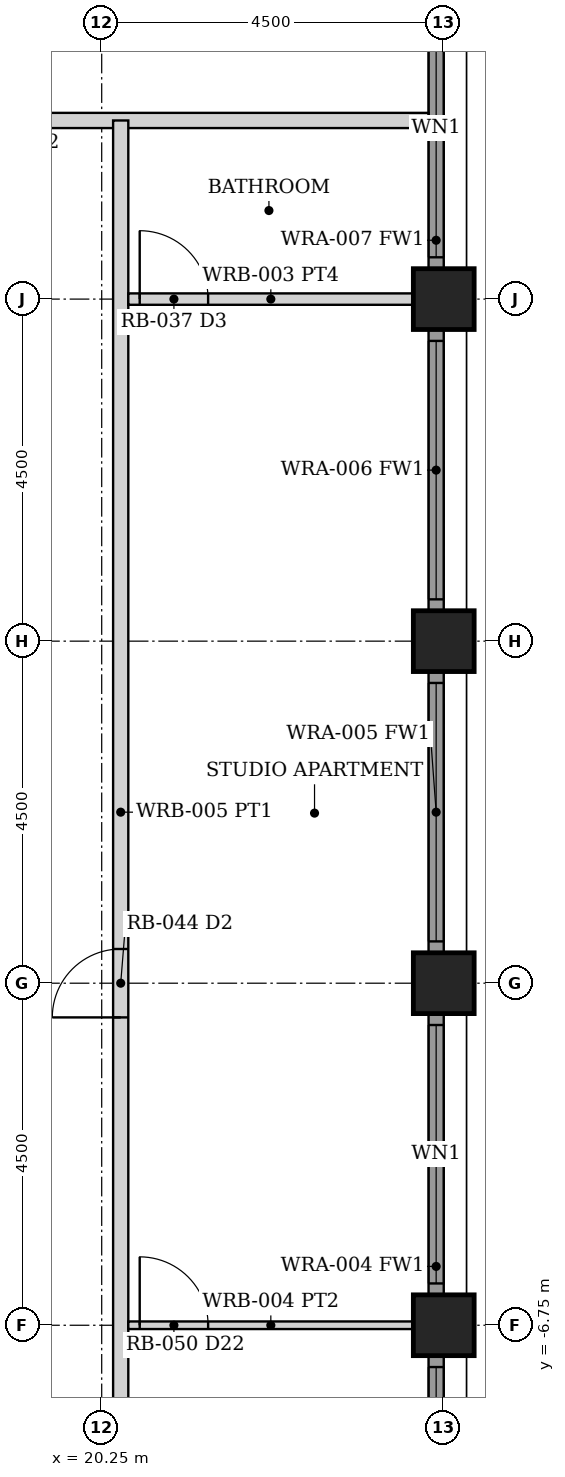
"""IFC4 building model, lengths in metres.
Left out: names, types, materials, properties, quantities, classifications, styles, units other than length and angle.
Written with IfcOpenShell. Run it as: python <this file> out.ifc"""

import sys

from ifc_helpers import new_model, si_unit, direction, frame, frame_2d, origin, origin_2d, place, context, subcontext, project, spatial, rectangle, hollow_rectangle, extrude, element, fill, save


model = new_model("IFC4")
c1 = context("Model", 3, precision=1e-05, world=origin(), true_north=direction((0.0, 1.0)))
c2 = subcontext(c1, "Body", "Model", "MODEL_VIEW")
j1 = project(units=[si_unit("LENGTHUNIT", "METRE"), si_unit("PLANEANGLEUNIT", "RADIAN")], contexts=[c1])
p1 = place(None, origin())
s1 = spatial("IfcSite", under=j1, at=p1, CompositionType="ELEMENT")
p2 = place(p1, origin())
s2 = spatial("IfcBuilding", under=s1, at=p2, CompositionType="ELEMENT")
p3 = place(p2, frame((0.0, 0.0, 37.0)))
s3 = spatial("IfcBuildingStorey", under=s2, at=p3, CompositionType="ELEMENT", Elevation=37.0)
for number, where, z_axis, x_axis in (
    (1, (24.75, -6.75, 0.0), (0.0, 0.0, 1.0), (1.0, 0.0, 0.0)),
    (2, (24.75, -2.25, 0.0), (0.0, 0.0, 1.0), (1.0, 0.0, 0.0)),
    (3, (24.75, 2.25, 0.0), (0.0, 0.0, 1.0), (1.0, 0.0, 0.0)),
    (4, (24.75, 6.75, 0.0), (0.0, 0.0, 1.0), (1.0, 0.0, 0.0)),
):
    element("IfcColumn", number, at=place(p3, frame(where, z_axis=z_axis, x_axis=x_axis)), inside=s3, PredefinedType="COLUMN", context=c2, shape_type="SweptSolid", body=[
        extrude(hollow_rectangle(XDim=0.8, YDim=0.8, WallThickness=0.07, at=origin_2d()), origin(), (0.0, 0.0, 1.0), 3.5),
    ])
p4 = place(p3, frame((24.65, -10.845, 0.0), z_axis=(0.0, 0.0, 1.0), x_axis=(0.0, 1.0, 0.0)))
e5 = element("IfcWall", 5, at=p4, inside=s3, PredefinedType="SOLIDWALL", context=c2, shape_type="SweptSolid", body=[
    extrude(rectangle(XDim=3.69, YDim=0.2, at=frame_2d((1.845, 0.0))), origin(), (0.0, 0.0, 1.0), 2.379),
])
p5 = place(p4, frame((0.145, 0.0, 0.3)))
e6 = element("IfcOpeningElement", 6, at=p5, cuts=e5, PredefinedType="OPENING", context=c2, shape_type="SweptSolid", body=[
    extrude(rectangle(XDim=3.4, YDim=1.929, at=frame_2d((1.7, 0.964))), frame((0.0, 0.11, 0.0), z_axis=(0.0, -1.0, 0.0), x_axis=(1.0, 0.0, 0.0)), (0.0, 0.0, 1.0), 0.22),
])
p6 = place(p3, frame((24.65, -6.345, 0.0), z_axis=(0.0, 0.0, 1.0), x_axis=(0.0, 1.0, 0.0)))
e7 = element("IfcWall", 7, at=p6, inside=s3, PredefinedType="SOLIDWALL", context=c2, shape_type="SweptSolid", body=[
    extrude(rectangle(XDim=3.69, YDim=0.2, at=frame_2d((1.845, 0.0))), origin(), (0.0, 0.0, 1.0), 2.379),
])
p7 = place(p6, frame((0.145, 0.0, 0.3)))
e8 = element("IfcOpeningElement", 8, at=p7, cuts=e7, PredefinedType="OPENING", context=c2, shape_type="SweptSolid", body=[
    extrude(rectangle(XDim=3.4, YDim=1.929, at=frame_2d((1.7, 0.964))), frame((0.0, 0.11, 0.0), z_axis=(0.0, -1.0, 0.0), x_axis=(1.0, 0.0, 0.0)), (0.0, 0.0, 1.0), 0.22),
])
p8 = place(p3, frame((24.65, -1.845, 0.0), z_axis=(0.0, 0.0, 1.0), x_axis=(0.0, 1.0, 0.0)))
e9 = element("IfcWall", 9, at=p8, inside=s3, PredefinedType="SOLIDWALL", context=c2, shape_type="SweptSolid", body=[
    extrude(rectangle(XDim=3.69, YDim=0.2, at=frame_2d((1.845, 0.0))), origin(), (0.0, 0.0, 1.0), 2.379),
])
p9 = place(p8, frame((0.145, 0.0, 0.3)))
e10 = element("IfcOpeningElement", 10, at=p9, cuts=e9, PredefinedType="OPENING", context=c2, shape_type="SweptSolid", body=[
    extrude(rectangle(XDim=3.4, YDim=1.929, at=frame_2d((1.7, 0.964))), frame((0.0, 0.11, 0.0), z_axis=(0.0, -1.0, 0.0), x_axis=(1.0, 0.0, 0.0)), (0.0, 0.0, 1.0), 0.22),
])
p10 = place(p3, frame((24.65, 2.655, 0.0), z_axis=(0.0, 0.0, 1.0), x_axis=(0.0, 1.0, 0.0)))
e11 = element("IfcWall", 11, at=p10, inside=s3, PredefinedType="SOLIDWALL", context=c2, shape_type="SweptSolid", body=[
    extrude(rectangle(XDim=3.69, YDim=0.2, at=frame_2d((1.845, 0.0))), origin(), (0.0, 0.0, 1.0), 2.379),
])
p11 = place(p10, frame((0.145, 0.0, 0.3)))
e12 = element("IfcOpeningElement", 12, at=p11, cuts=e11, PredefinedType="OPENING", context=c2, shape_type="SweptSolid", body=[
    extrude(rectangle(XDim=3.4, YDim=1.929, at=frame_2d((1.7, 0.964))), frame((0.0, 0.11, 0.0), z_axis=(0.0, -1.0, 0.0), x_axis=(1.0, 0.0, 0.0)), (0.0, 0.0, 1.0), 0.22),
])
p12 = place(p3, frame((24.65, 7.155, 0.0), z_axis=(0.0, 0.0, 1.0), x_axis=(0.0, 1.0, 0.0)))
e13 = element("IfcWall", 13, at=p12, inside=s3, PredefinedType="SOLIDWALL", context=c2, shape_type="SweptSolid", body=[
    extrude(rectangle(XDim=3.69, YDim=0.2, at=frame_2d((1.845, 0.0))), origin(), (0.0, 0.0, 1.0), 2.379),
])
p13 = place(p12, frame((0.145, 0.0, 0.3)))
e14 = element("IfcOpeningElement", 14, at=p13, cuts=e13, PredefinedType="OPENING", context=c2, shape_type="SweptSolid", body=[
    extrude(rectangle(XDim=3.4, YDim=1.929, at=frame_2d((1.7, 0.964))), frame((0.0, 0.11, 0.0), z_axis=(0.0, -1.0, 0.0), x_axis=(1.0, 0.0, 0.0)), (0.0, 0.0, 1.0), 0.22),
])
p14 = place(p3, frame((-24.55, 9.1, 0.0), z_axis=(0.0, 0.0, 1.0), x_axis=(1.0, 0.0, 0.0)))
e15 = element("IfcWall", 15, at=p14, inside=s3, PredefinedType="PARTITIONING", context=c2, shape_type="SweptSolid", body=[
    extrude(rectangle(XDim=49.1, YDim=0.2, at=frame_2d((24.55, 0.0))), origin(), (0.0, 0.0, 1.0), 2.373),
])
p15 = place(p14, frame((5.1, 0.0, 0.0)))
e16 = element("IfcOpeningElement", 16, at=p15, cuts=e15, PredefinedType="OPENING", context=c2, shape_type="SweptSolid", body=[
    extrude(rectangle(XDim=0.9, YDim=2.1, at=frame_2d((0.45, 1.05))), frame((0.0, 0.11, 0.0), z_axis=(0.0, -1.0, 0.0), x_axis=(1.0, 0.0, 0.0)), (0.0, 0.0, 1.0), 0.22),
])
p16 = place(p14, frame((13.6, 0.0, 0.0)))
e17 = element("IfcOpeningElement", 17, at=p16, cuts=e15, PredefinedType="OPENING", context=c2, shape_type="SweptSolid", body=[
    extrude(rectangle(XDim=0.9, YDim=2.1, at=frame_2d((0.45, 1.05))), frame((0.0, 0.11, 0.0), z_axis=(0.0, -1.0, 0.0), x_axis=(1.0, 0.0, 0.0)), (0.0, 0.0, 1.0), 0.22),
])
p17 = place(p14, frame((18.0, 0.0, 0.0)))
e18 = element("IfcOpeningElement", 18, at=p17, cuts=e15, PredefinedType="OPENING", context=c2, shape_type="SweptSolid", body=[
    extrude(rectangle(XDim=0.9, YDim=2.1, at=frame_2d((0.45, 1.05))), frame((0.0, 0.11, 0.0), z_axis=(0.0, -1.0, 0.0), x_axis=(1.0, 0.0, 0.0)), (0.0, 0.0, 1.0), 0.22),
])
p18 = place(p14, frame((22.5, 0.0, 0.0)))
e19 = element("IfcOpeningElement", 19, at=p18, cuts=e15, PredefinedType="OPENING", context=c2, shape_type="SweptSolid", body=[
    extrude(rectangle(XDim=0.9, YDim=2.1, at=frame_2d((0.45, 1.05))), frame((0.0, 0.11, 0.0), z_axis=(0.0, -1.0, 0.0), x_axis=(1.0, 0.0, 0.0)), (0.0, 0.0, 1.0), 0.22),
])
p19 = place(p14, frame((27.0, 0.0, 0.0)))
e20 = element("IfcOpeningElement", 20, at=p19, cuts=e15, PredefinedType="OPENING", context=c2, shape_type="SweptSolid", body=[
    extrude(rectangle(XDim=0.9, YDim=2.1, at=frame_2d((0.45, 1.05))), frame((0.0, 0.11, 0.0), z_axis=(0.0, -1.0, 0.0), x_axis=(1.0, 0.0, 0.0)), (0.0, 0.0, 1.0), 0.22),
])
p20 = place(p14, frame((31.6, 0.0, 0.0)))
e21 = element("IfcOpeningElement", 21, at=p20, cuts=e15, PredefinedType="OPENING", context=c2, shape_type="SweptSolid", body=[
    extrude(rectangle(XDim=0.9, YDim=2.1, at=frame_2d((0.45, 1.05))), frame((0.0, 0.11, 0.0), z_axis=(0.0, -1.0, 0.0), x_axis=(1.0, 0.0, 0.0)), (0.0, 0.0, 1.0), 0.22),
])
p21 = place(p14, frame((43.1, 0.0, 0.0)))
e22 = element("IfcOpeningElement", 22, at=p21, cuts=e15, PredefinedType="OPENING", context=c2, shape_type="SweptSolid", body=[
    extrude(rectangle(XDim=0.9, YDim=2.1, at=frame_2d((0.45, 1.05))), frame((0.0, 0.11, 0.0), z_axis=(0.0, -1.0, 0.0), x_axis=(1.0, 0.0, 0.0)), (0.0, 0.0, 1.0), 0.22),
])
p22 = place(p3, frame((20.5, -9.1, 0.0), z_axis=(0.0, 0.0, 1.0), x_axis=(0.0, 1.0, 0.0)))
e23 = element("IfcWall", 23, at=p22, inside=s3, PredefinedType="PARTITIONING", context=c2, shape_type="SweptSolid", body=[
    extrude(rectangle(XDim=18.2, YDim=0.2, at=frame_2d((9.1, 0.0))), origin(), (0.0, 0.0, 1.0), 2.373),
])
p23 = place(p22, frame((6.4, 0.0, 0.0)))
e24 = element("IfcOpeningElement", 24, at=p23, cuts=e23, PredefinedType="OPENING", context=c2, shape_type="SweptSolid", body=[
    extrude(rectangle(XDim=0.9, YDim=2.1, at=frame_2d((0.45, 1.05))), frame((0.0, 0.11, 0.0), z_axis=(0.0, -1.0, 0.0), x_axis=(1.0, 0.0, 0.0)), (0.0, 0.0, 1.0), 0.22),
])
p24 = place(p3, frame((20.6, -6.75, 0.0), z_axis=(0.0, 0.0, 1.0), x_axis=(1.0, 0.0, 0.0)))
e25 = element("IfcWall", 25, at=p24, inside=s3, PredefinedType="PARTITIONING", context=c2, shape_type="SweptSolid", body=[
    extrude(rectangle(XDim=3.75, YDim=0.1, at=frame_2d((1.875, 0.0))), origin(), (0.0, 0.0, 1.0), 2.373),
])
p25 = place(p24, frame((0.15, 0.0, 0.0)))
e26 = element("IfcOpeningElement", 26, at=p25, cuts=e25, PredefinedType="OPENING", context=c2, shape_type="SweptSolid", body=[
    extrude(rectangle(XDim=0.9, YDim=2.1, at=frame_2d((0.45, 1.05))), frame((0.0, 0.06, 0.0), z_axis=(0.0, -1.0, 0.0), x_axis=(1.0, 0.0, 0.0)), (0.0, 0.0, 1.0), 0.12),
])
p26 = place(p3, frame((20.6, 6.75, 0.0), z_axis=(0.0, 0.0, 1.0), x_axis=(1.0, 0.0, 0.0)))
e27 = element("IfcWall", 27, at=p26, inside=s3, PredefinedType="PARTITIONING", context=c2, shape_type="SweptSolid", body=[
    extrude(rectangle(XDim=3.75, YDim=0.15, at=frame_2d((1.875, 0.0))), origin(), (0.0, 0.0, 1.0), 2.373),
])
p27 = place(p26, frame((0.15, 0.0, 0.0)))
e28 = element("IfcOpeningElement", 28, at=p27, cuts=e27, PredefinedType="OPENING", context=c2, shape_type="SweptSolid", body=[
    extrude(rectangle(XDim=0.9, YDim=2.1, at=frame_2d((0.45, 1.05))), frame((0.0, 0.085, 0.0), z_axis=(0.0, -1.0, 0.0), x_axis=(1.0, 0.0, 0.0)), (0.0, 0.0, 1.0), 0.17),
])
p28 = place(p5, origin())
e29 = element("IfcWindow", 29, at=p28, inside=s3, PartitioningType="SINGLE_PANEL", PredefinedType="WINDOW", context=c2, shape_type="SweptSolid", body=[
    extrude(rectangle(XDim=3.4, YDim=1.929, at=frame_2d((1.7, 0.964))), frame((0.0, 0.03, 0.0), z_axis=(0.0, -1.0, 0.0), x_axis=(1.0, 0.0, 0.0)), (0.0, 0.0, 1.0), 0.06),
])
fill(e6, e29)
p29 = place(p7, origin())
e30 = element("IfcWindow", 30, at=p29, inside=s3, PartitioningType="SINGLE_PANEL", PredefinedType="WINDOW", context=c2, shape_type="SweptSolid", body=[
    extrude(rectangle(XDim=3.4, YDim=1.929, at=frame_2d((1.7, 0.964))), frame((0.0, 0.03, 0.0), z_axis=(0.0, -1.0, 0.0), x_axis=(1.0, 0.0, 0.0)), (0.0, 0.0, 1.0), 0.06),
])
fill(e8, e30)
p30 = place(p9, origin())
e31 = element("IfcWindow", 31, at=p30, inside=s3, PartitioningType="SINGLE_PANEL", PredefinedType="WINDOW", context=c2, shape_type="SweptSolid", body=[
    extrude(rectangle(XDim=3.4, YDim=1.929, at=frame_2d((1.7, 0.964))), frame((0.0, 0.03, 0.0), z_axis=(0.0, -1.0, 0.0), x_axis=(1.0, 0.0, 0.0)), (0.0, 0.0, 1.0), 0.06),
])
fill(e10, e31)
p31 = place(p11, origin())
e32 = element("IfcWindow", 32, at=p31, inside=s3, PartitioningType="SINGLE_PANEL", PredefinedType="WINDOW", context=c2, shape_type="SweptSolid", body=[
    extrude(rectangle(XDim=3.4, YDim=1.929, at=frame_2d((1.7, 0.964))), frame((0.0, 0.03, 0.0), z_axis=(0.0, -1.0, 0.0), x_axis=(1.0, 0.0, 0.0)), (0.0, 0.0, 1.0), 0.06),
])
fill(e12, e32)
p32 = place(p13, origin())
e33 = element("IfcWindow", 33, at=p32, inside=s3, PartitioningType="SINGLE_PANEL", PredefinedType="WINDOW", context=c2, shape_type="SweptSolid", body=[
    extrude(rectangle(XDim=3.4, YDim=1.929, at=frame_2d((1.7, 0.964))), frame((0.0, 0.03, 0.0), z_axis=(0.0, -1.0, 0.0), x_axis=(1.0, 0.0, 0.0)), (0.0, 0.0, 1.0), 0.06),
])
fill(e14, e33)
p33 = place(p25, origin())
e34 = element("IfcDoor", 34, at=p33, inside=s3, OperationType="SINGLE_SWING_LEFT", PredefinedType="DOOR", context=c2, shape_type="SweptSolid", body=[
    extrude(rectangle(XDim=0.9, YDim=2.1, at=frame_2d((0.45, 1.05))), frame((0.0, 0.025, 0.0), z_axis=(0.0, -1.0, 0.0), x_axis=(1.0, 0.0, 0.0)), (0.0, 0.0, 1.0), 0.05),
])
fill(e26, e34)
p34 = place(p27, origin())
e35 = element("IfcDoor", 35, at=p34, inside=s3, OperationType="SINGLE_SWING_LEFT", PredefinedType="DOOR", context=c2, shape_type="SweptSolid", body=[
    extrude(rectangle(XDim=0.9, YDim=2.1, at=frame_2d((0.45, 1.05))), frame((0.0, 0.025, 0.0), z_axis=(0.0, -1.0, 0.0), x_axis=(1.0, 0.0, 0.0)), (0.0, 0.0, 1.0), 0.05),
])
fill(e28, e35)
p35 = place(p23, origin())
e36 = element("IfcDoor", 36, at=p35, inside=s3, OperationType="SINGLE_SWING_LEFT", PredefinedType="DOOR", context=c2, shape_type="SweptSolid", body=[
    extrude(rectangle(XDim=0.9, YDim=2.1, at=frame_2d((0.45, 1.05))), frame((0.0, 0.025, 0.0), z_axis=(0.0, -1.0, 0.0), x_axis=(1.0, 0.0, 0.0)), (0.0, 0.0, 1.0), 0.05),
])
fill(e24, e36)
save(model, sys.argv[1])
